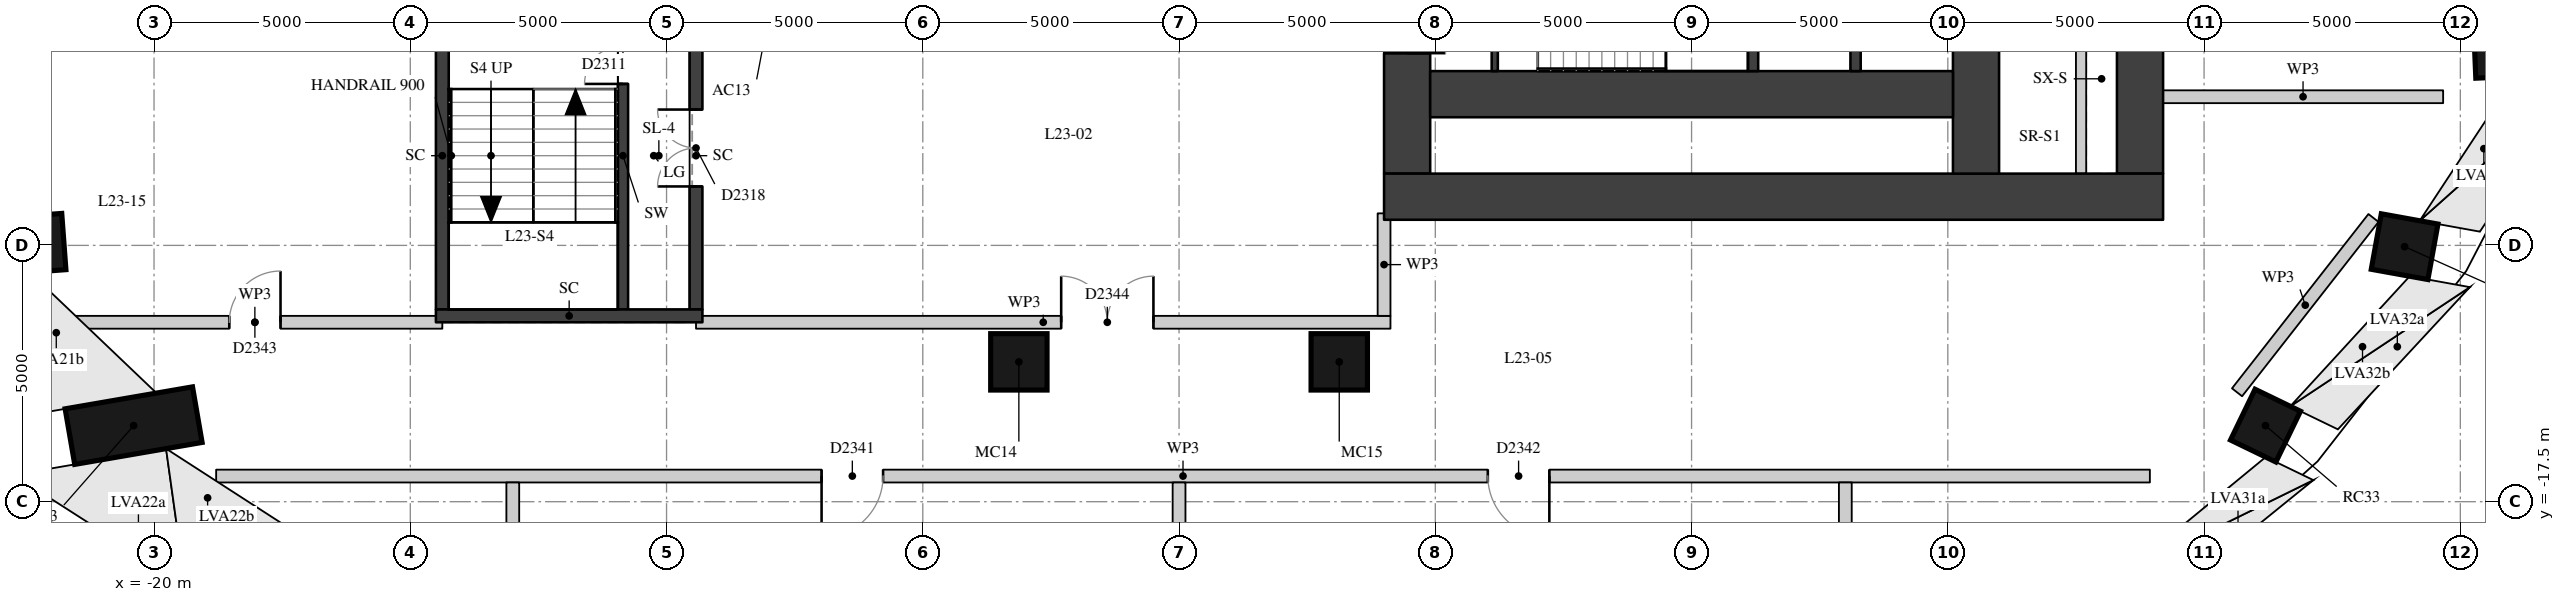
"""IFC4 building model, lengths in metres.
Left out: names, types, materials, properties, quantities, classifications, styles, units other than length and angle.
Written with IfcOpenShell. Run it as: python <this file> out.ifc"""

import sys

from ifc_helpers import new_model, si_unit, direction, frame, frame_2d, origin, origin_2d, place, context, subcontext, project, spatial, rectangle, extrude, element, fill, save


model = new_model("IFC4")
c1 = context("Model", 3, precision=1e-05, world=origin(), true_north=direction((0.0, 1.0)))
c2 = subcontext(c1, "Body", "Model", "MODEL_VIEW")
j1 = project(units=[si_unit("LENGTHUNIT", "METRE"), si_unit("PLANEANGLEUNIT", "RADIAN")], contexts=[c1])
p1 = place(None, origin())
s1 = spatial("IfcSite", under=j1, at=p1, CompositionType="ELEMENT")
p2 = place(p1, origin())
s2 = spatial("IfcBuilding", under=s1, at=p2, CompositionType="ELEMENT")
p3 = place(p2, frame((0.0, 0.0, 84.4)))
s3 = spatial("IfcBuildingStorey", under=s2, at=p3, CompositionType="ELEMENT", Elevation=84.4)
p4 = place(p3, frame((-24.465, -12.625, 0.452), z_axis=(0.600492037274, 0.044382544764, 0.798398085476), x_axis=(-0.796226262122, -0.058849319437, 0.602129966958)))
e1 = element("IfcColumn", 1, at=p4, inside=s3, PredefinedType="COLUMN", context=c2, shape_type="SweptSolid", body=[
    extrude(rectangle(XDim=1.5, YDim=1.1, at=origin_2d()), origin(), (0.0, 0.0, 1.0), 4.505),
])
p5 = place(p3, frame((-21.641, -16.23, 0.427), z_axis=(0.560538019427, 0.096634992544, 0.822471158761), x_axis=(-0.81051482165, -0.139730207465, 0.56880681519)))
e2 = element("IfcColumn", 2, at=p5, inside=s3, PredefinedType="COLUMN", context=c2, shape_type="SweptSolid", body=[
    extrude(rectangle(XDim=1.5, YDim=1.1, at=origin_2d()), origin(), (0.0, 0.0, 1.0), 4.434),
])
p6 = place(p3, frame((18.159, -19.343, 0.154), z_axis=(-0.143335748736, 0.14601438897, 0.978843532618), x_axis=(0.685710012277, -0.698524473739, 0.204610211505)))
e3 = element("IfcColumn", 3, at=p6, inside=s3, PredefinedType="COLUMN", context=c2, shape_type="SweptSolid", body=[
    extrude(rectangle(XDim=1.5, YDim=1.1, at=origin_2d()), origin(), (0.0, 0.0, 1.0), 4.284),
])
p7 = place(p3, frame((21.641, -16.23, 0.173), z_axis=(-0.207405022702, 0.100357269049, 0.97309381619), x_axis=(0.875939401139, -0.423841645712, 0.230409255224)))
e4 = element("IfcColumn", 4, at=p7, inside=s3, PredefinedType="COLUMN", context=c2, shape_type="SweptSolid", body=[
    extrude(rectangle(XDim=1.5, YDim=1.1, at=origin_2d()), origin(), (0.0, 0.0, 1.0), 4.27),
])
p8 = place(p3, frame((24.465, -12.625, 0.198), z_axis=(-0.259805612437, 0.046992225394, 0.964516860661), x_axis=(0.949116348071, -0.171671000236, 0.264021259563)))
e5 = element("IfcColumn", 5, at=p8, inside=s3, PredefinedType="COLUMN", context=c2, shape_type="SweptSolid", body=[
    extrude(rectangle(XDim=1.5, YDim=1.1, at=origin_2d()), origin(), (0.0, 0.0, 1.0), 4.255),
])
p9 = place(p3, frame((26.546, -8.636, 0.224), z_axis=(-0.298484434713, -0.012420080504, 0.95433368579), x_axis=(0.953508575153, 0.039675949188, 0.298742725712)))
e6 = element("IfcColumn", 6, at=p9, inside=s3, PredefinedType="COLUMN", context=c2, shape_type="SweptSolid", body=[
    extrude(rectangle(XDim=1.5, YDim=1.1, at=origin_2d()), origin(), (0.0, 0.0, 1.0), 4.246),
])
for number, where, z_axis, x_axis in (
    (7, (-3.126, -14.772, 0.0), (0.0, 0.0, 1.0), (1.0, 0.0, 0.0)),
    (8, (3.126, -14.772, 0.0), (0.0, 0.0, 1.0), (1.0, 0.0, 0.0)),
):
    element("IfcColumn", number, at=place(p3, frame(where, z_axis=z_axis, x_axis=x_axis)), inside=s3, PredefinedType="COLUMN", context=c2, shape_type="SweptSolid", body=[
        extrude(rectangle(XDim=1.1, YDim=1.1, at=origin_2d()), origin(), (0.0, 0.0, 1.0), 4.5),
    ])
p10 = place(p3, frame((4.45, -11.1, 0.0), z_axis=(0.0, 0.0, 1.0), x_axis=(0.0, 1.0, 0.0)))
e9 = element("IfcWall", 9, at=p10, inside=s3, PredefinedType="SHEAR", context=c2, shape_type="SweptSolid", body=[
    extrude(rectangle(XDim=22.2, YDim=0.9, at=frame_2d((11.1, 0.0))), origin(), (0.0, 0.0, 1.0), 4.22),
])
p11 = place(p10, frame((2.35, 0.0, 0.0)))
e10 = element("IfcOpeningElement", 10, at=p11, cuts=e9, PredefinedType="OPENING", context=c2, shape_type="SweptSolid", body=[
    extrude(rectangle(XDim=1.5, YDim=2.1, at=frame_2d((0.75, 1.05))), frame((0.0, 0.46, 0.0), z_axis=(0.0, -1.0, 0.0), x_axis=(1.0, 0.0, 0.0)), (0.0, 0.0, 1.0), 0.92),
])
p12 = place(p10, frame((5.45, 0.0, 0.0)))
e11 = element("IfcOpeningElement", 11, at=p12, cuts=e9, PredefinedType="OPENING", context=c2, shape_type="SweptSolid", body=[
    extrude(rectangle(XDim=1.8, YDim=2.1, at=frame_2d((0.9, 1.05))), frame((0.0, 0.46, 0.0), z_axis=(0.0, -1.0, 0.0), x_axis=(1.0, 0.0, 0.0)), (0.0, 0.0, 1.0), 0.92),
])
p13 = place(p10, frame((7.95, 0.0, 0.0)))
e12 = element("IfcOpeningElement", 12, at=p13, cuts=e9, PredefinedType="OPENING", context=c2, shape_type="SweptSolid", body=[
    extrude(rectangle(XDim=1.1, YDim=2.1, at=frame_2d((0.55, 1.05))), frame((0.0, 0.46, 0.0), z_axis=(0.0, -1.0, 0.0), x_axis=(1.0, 0.0, 0.0)), (0.0, 0.0, 1.0), 0.92),
])
p14 = place(p10, frame((10.6, 0.0, 0.0)))
e13 = element("IfcOpeningElement", 13, at=p14, cuts=e9, PredefinedType="OPENING", context=c2, shape_type="SweptSolid", body=[
    extrude(rectangle(XDim=1.0, YDim=2.1, at=frame_2d((0.5, 1.05))), frame((0.0, 0.46, 0.0), z_axis=(0.0, -1.0, 0.0), x_axis=(1.0, 0.0, 0.0)), (0.0, 0.0, 1.0), 0.92),
])
p15 = place(p10, frame((13.15, 0.0, 0.0)))
e14 = element("IfcOpeningElement", 14, at=p15, cuts=e9, PredefinedType="OPENING", context=c2, shape_type="SweptSolid", body=[
    extrude(rectangle(XDim=1.1, YDim=2.1, at=frame_2d((0.55, 1.05))), frame((0.0, 0.46, 0.0), z_axis=(0.0, -1.0, 0.0), x_axis=(1.0, 0.0, 0.0)), (0.0, 0.0, 1.0), 0.92),
])
p16 = place(p10, frame((14.95, 0.0, 0.0)))
e15 = element("IfcOpeningElement", 15, at=p16, cuts=e9, PredefinedType="OPENING", context=c2, shape_type="SweptSolid", body=[
    extrude(rectangle(XDim=1.8, YDim=2.1, at=frame_2d((0.9, 1.05))), frame((0.0, 0.46, 0.0), z_axis=(0.0, -1.0, 0.0), x_axis=(1.0, 0.0, 0.0)), (0.0, 0.0, 1.0), 0.92),
])
p17 = place(p10, frame((18.35, 0.0, 0.0)))
e16 = element("IfcOpeningElement", 16, at=p17, cuts=e9, PredefinedType="OPENING", context=c2, shape_type="SweptSolid", body=[
    extrude(rectangle(XDim=1.5, YDim=2.1, at=frame_2d((0.75, 1.05))), frame((0.0, 0.46, 0.0), z_axis=(0.0, -1.0, 0.0), x_axis=(1.0, 0.0, 0.0)), (0.0, 0.0, 1.0), 0.92),
])
p18 = place(p3, frame((18.75, -11.1, 0.0), z_axis=(0.0, 0.0, 1.0), x_axis=(0.0, 1.0, 0.0)))
e17 = element("IfcWall", 17, at=p18, inside=s3, PredefinedType="SHEAR", context=c2, shape_type="SweptSolid", body=[
    extrude(rectangle(XDim=22.2, YDim=0.9, at=frame_2d((11.1, 0.0))), origin(), (0.0, 0.0, 1.0), 4.22),
])
p19 = place(p3, frame((4.0, -11.55, 0.0), z_axis=(0.0, 0.0, 1.0), x_axis=(1.0, 0.0, 0.0)))
e18 = element("IfcWall", 18, at=p19, inside=s3, PredefinedType="SHEAR", context=c2, shape_type="SweptSolid", body=[
    extrude(rectangle(XDim=15.2, YDim=0.9, at=frame_2d((7.6, 0.0))), origin(), (0.0, 0.0, 1.0), 4.22),
])
p20 = place(p3, frame((15.55, -11.1, 0.0), z_axis=(0.0, 0.0, 1.0), x_axis=(0.0, 1.0, 0.0)))
e19 = element("IfcWall", 19, at=p20, inside=s3, PredefinedType="SHEAR", context=c2, shape_type="SweptSolid", body=[
    extrude(rectangle(XDim=22.2, YDim=0.9, at=frame_2d((11.1, 0.0))), origin(), (0.0, 0.0, 1.0), 4.22),
])
p21 = place(p20, frame((15.6, 0.0, 0.0)))
e20 = element("IfcOpeningElement", 20, at=p21, cuts=e19, PredefinedType="OPENING", context=c2, shape_type="SweptSolid", body=[
    extrude(rectangle(XDim=1.0, YDim=2.1, at=frame_2d((0.5, 1.05))), frame((0.0, 0.46, 0.0), z_axis=(0.0, -1.0, 0.0), x_axis=(1.0, 0.0, 0.0)), (0.0, 0.0, 1.0), 0.92),
])
p22 = place(p20, frame((5.6, 0.0, 0.0)))
e21 = element("IfcOpeningElement", 21, at=p22, cuts=e19, PredefinedType="OPENING", context=c2, shape_type="SweptSolid", body=[
    extrude(rectangle(XDim=1.0, YDim=2.1, at=frame_2d((0.5, 1.05))), frame((0.0, 0.46, 0.0), z_axis=(0.0, -1.0, 0.0), x_axis=(1.0, 0.0, 0.0)), (0.0, 0.0, 1.0), 0.92),
])
p23 = place(p3, frame((4.9, -9.55, 0.0), z_axis=(0.0, 0.0, 1.0), x_axis=(1.0, 0.0, 0.0)))
e22 = element("IfcWall", 22, at=p23, inside=s3, PredefinedType="SHEAR", context=c2, shape_type="SweptSolid", body=[
    extrude(rectangle(XDim=10.2, YDim=0.9, at=frame_2d((5.1, 0.0))), origin(), (0.0, 0.0, 1.0), 4.22),
])
for number, where, z_axis, x_axis in (
    (23, (11.2, -9.1, 0.0), (0.0, 0.0, 1.0), (0.0, 1.0, 0.0)),
    (24, (13.2, -9.1, 0.0), (0.0, 0.0, 1.0), (0.0, 1.0, 0.0)),
):
    element("IfcWall", number, at=place(p3, frame(where, z_axis=z_axis, x_axis=x_axis)), inside=s3, PredefinedType="SHEAR", context=c2, shape_type="SweptSolid", body=[
        extrude(rectangle(XDim=3.2, YDim=0.2, at=frame_2d((1.6, 0.0))), origin(), (0.0, 0.0, 1.0), 4.22),
    ])
p24 = place(p3, frame((6.16, -9.1, 0.0), z_axis=(0.0, 0.0, 1.0), x_axis=(0.0, 1.0, 0.0)))
e25 = element("IfcWall", 25, at=p24, inside=s3, PredefinedType="SHEAR", context=c2, shape_type="SweptSolid", body=[
    extrude(rectangle(XDim=3.2, YDim=0.12, at=frame_2d((1.6, 0.0))), origin(), (0.0, 0.0, 1.0), 4.22),
])
p25 = place(p24, frame((0.85, 0.0, 0.0)))
e26 = element("IfcOpeningElement", 26, at=p25, cuts=e25, PredefinedType="OPENING", context=c2, shape_type="SweptSolid", body=[
    extrude(rectangle(XDim=1.5, YDim=2.1, at=frame_2d((0.75, 1.05))), frame((0.0, 0.07, 0.0), z_axis=(0.0, -1.0, 0.0), x_axis=(1.0, 0.0, 0.0)), (0.0, 0.0, 1.0), 0.14),
])
p26 = place(p3, frame((-10.85, -13.75, 0.0), z_axis=(0.0, 0.0, 1.0), x_axis=(0.0, 1.0, 0.0)))
e27 = element("IfcWall", 27, at=p26, inside=s3, PredefinedType="SHEAR", context=c2, shape_type="SweptSolid", body=[
    extrude(rectangle(XDim=6.0, YDim=0.2, at=frame_2d((3.0, 0.0))), origin(), (0.0, 0.0, 1.0), 4.22),
])
p27 = place(p26, frame((4.4, 0.0, 0.0)))
e28 = element("IfcOpeningElement", 28, at=p27, cuts=e27, PredefinedType="OPENING", context=c2, shape_type="SweptSolid", body=[
    extrude(rectangle(XDim=1.5, YDim=2.1, at=frame_2d((0.75, 1.05))), frame((0.0, 0.11, 0.0), z_axis=(0.0, -1.0, 0.0), x_axis=(1.0, 0.0, 0.0)), (0.0, 0.0, 1.0), 0.22),
])
p28 = place(p3, frame((17.6, -11.1, 0.0), z_axis=(0.0, 0.0, 1.0), x_axis=(0.0, 1.0, 0.0)))
e29 = element("IfcWall", 29, at=p28, inside=s3, PredefinedType="PARTITIONING", context=c2, shape_type="SweptSolid", body=[
    extrude(rectangle(XDim=3.7, YDim=0.2, at=frame_2d((1.85, 0.0))), origin(), (0.0, 0.0, 1.0), 4.22),
])
p29 = place(p3, frame((-14.375, -13.75, -0.45), z_axis=(0.0, 0.0, 1.0), x_axis=(0.0, 1.0, 0.0)))
e30 = element("IfcWall", 30, at=p29, inside=s3, PredefinedType="SHEAR", context=c2, shape_type="SweptSolid", body=[
    extrude(rectangle(XDim=6.0, YDim=0.25, at=frame_2d((3.0, 0.0))), origin(), (0.0, 0.0, 1.0), 4.67),
])
p30 = place(p3, frame((-9.425, -13.75, -0.45), z_axis=(0.0, 0.0, 1.0), x_axis=(0.0, 1.0, 0.0)))
e31 = element("IfcWall", 31, at=p30, inside=s3, PredefinedType="SHEAR", context=c2, shape_type="SweptSolid", body=[
    extrude(rectangle(XDim=6.0, YDim=0.25, at=frame_2d((3.0, 0.0))), origin(), (0.0, 0.0, 1.0), 4.67),
])
p31 = place(p30, frame((2.4, 0.0, 0.45)))
e32 = element("IfcOpeningElement", 32, at=p31, cuts=e31, PredefinedType="OPENING", context=c2, shape_type="SweptSolid", body=[
    extrude(rectangle(XDim=1.5, YDim=2.1, at=frame_2d((0.75, 1.05))), frame((0.0, 0.135, 0.0), z_axis=(0.0, -1.0, 0.0), x_axis=(1.0, 0.0, 0.0)), (0.0, 0.0, 1.0), 0.27),
])
p32 = place(p3, frame((-14.5, -13.875, -0.45), z_axis=(0.0, 0.0, 1.0), x_axis=(1.0, 0.0, 0.0)))
e33 = element("IfcWall", 33, at=p32, inside=s3, PredefinedType="SHEAR", context=c2, shape_type="SweptSolid", body=[
    extrude(rectangle(XDim=5.2, YDim=0.25, at=frame_2d((2.6, 0.0))), origin(), (0.0, 0.0, 1.0), 4.67),
])
p33 = place(p3, frame((20.643, -15.366, 0.0), z_axis=(0.0, 0.0, 1.0), x_axis=(0.61641495594, 0.787421489479, 0.0)))
e34 = element("IfcWall", 34, at=p33, inside=s3, PredefinedType="PARTITIONING", context=c2, shape_type="SweptSolid", body=[
    extrude(rectangle(XDim=4.319, YDim=0.25, at=frame_2d((2.159, 0.0))), origin(), (0.0, 0.0, 1.0), 4.22),
])
p34 = place(p3, frame((-18.788, -17.0, 0.0), z_axis=(0.0, 0.0, 1.0), x_axis=(1.0, 0.0, 0.0)))
e35 = element("IfcWall", 35, at=p34, inside=s3, PredefinedType="PARTITIONING", context=c2, shape_type="SweptSolid", body=[
    extrude(rectangle(XDim=37.73, YDim=0.25, at=frame_2d((18.865, 0.0))), origin(), (0.0, 0.0, 1.0), 4.22),
])
p35 = place(p34, frame((11.813, 0.0, 0.0)))
e36 = element("IfcOpeningElement", 36, at=p35, cuts=e35, PredefinedType="OPENING", context=c2, shape_type="SweptSolid", body=[
    extrude(rectangle(XDim=1.2, YDim=2.1, at=frame_2d((0.6, 1.05))), frame((0.0, 0.135, 0.0), z_axis=(0.0, -1.0, 0.0), x_axis=(1.0, 0.0, 0.0)), (0.0, 0.0, 1.0), 0.27),
])
p36 = place(p34, frame((24.813, 0.0, 0.0)))
e37 = element("IfcOpeningElement", 37, at=p36, cuts=e35, PredefinedType="OPENING", context=c2, shape_type="SweptSolid", body=[
    extrude(rectangle(XDim=1.2, YDim=2.1, at=frame_2d((0.6, 1.05))), frame((0.0, 0.135, 0.0), z_axis=(0.0, -1.0, 0.0), x_axis=(1.0, 0.0, 0.0)), (0.0, 0.0, 1.0), 0.27),
])
p37 = place(p3, frame((-21.69, -14.0, 0.0), z_axis=(0.0, 0.0, 1.0), x_axis=(1.0, 0.0, 0.0)))
e38 = element("IfcWall", 38, at=p37, inside=s3, PredefinedType="PARTITIONING", context=c2, shape_type="SweptSolid", body=[
    extrude(rectangle(XDim=7.315, YDim=0.25, at=frame_2d((3.657, 0.0))), origin(), (0.0, 0.0, 1.0), 4.22),
])
p38 = place(p37, frame((3.158, 0.0, 0.0)))
e39 = element("IfcOpeningElement", 39, at=p38, cuts=e38, PredefinedType="OPENING", context=c2, shape_type="SweptSolid", body=[
    extrude(rectangle(XDim=1.0, YDim=2.1, at=frame_2d((0.5, 1.05))), frame((0.0, 0.135, 0.0), z_axis=(0.0, -1.0, 0.0), x_axis=(1.0, 0.0, 0.0)), (0.0, 0.0, 1.0), 0.27),
])
p39 = place(p3, frame((-9.425, -14.0, 0.0), z_axis=(0.0, 0.0, 1.0), x_axis=(1.0, 0.0, 0.0)))
e40 = element("IfcWall", 40, at=p39, inside=s3, PredefinedType="PARTITIONING", context=c2, shape_type="SweptSolid", body=[
    extrude(rectangle(XDim=13.55, YDim=0.25, at=frame_2d((6.775, 0.0))), origin(), (0.0, 0.0, 1.0), 4.22),
])
p40 = place(p39, frame((7.125, 0.0, 0.0)))
e41 = element("IfcOpeningElement", 41, at=p40, cuts=e40, PredefinedType="OPENING", context=c2, shape_type="SweptSolid", body=[
    extrude(rectangle(XDim=1.8, YDim=2.1, at=frame_2d((0.9, 1.05))), frame((0.0, 0.135, 0.0), z_axis=(0.0, -1.0, 0.0), x_axis=(1.0, 0.0, 0.0)), (0.0, 0.0, 1.0), 0.27),
])
p41 = place(p3, frame((19.198, -9.6, 0.0), z_axis=(0.0, 0.0, 1.0), x_axis=(1.0, 0.0, 0.0)))
e42 = element("IfcWall", 42, at=p41, inside=s3, PredefinedType="PARTITIONING", context=c2, shape_type="SweptSolid", body=[
    extrude(rectangle(XDim=5.467, YDim=0.25, at=frame_2d((2.733, 0.0))), origin(), (0.0, 0.0, 1.0), 4.22),
])
p42 = place(p3, frame((-13.0, -20.989, 0.0), z_axis=(0.0, 0.0, 1.0), x_axis=(0.0, 1.0, 0.0)))
e43 = element("IfcWall", 43, at=p42, inside=s3, PredefinedType="PARTITIONING", context=c2, shape_type="SweptSolid", body=[
    extrude(rectangle(XDim=3.864, YDim=0.25, at=frame_2d((1.932, 0.0))), origin(), (0.0, 0.0, 1.0), 3.77),
])
p43 = place(p3, frame((0.0, -24.045, 0.0), z_axis=(0.0, 0.0, 1.0), x_axis=(0.0, 1.0, 0.0)))
e44 = element("IfcWall", 44, at=p43, inside=s3, PredefinedType="PARTITIONING", context=c2, shape_type="SweptSolid", body=[
    extrude(rectangle(XDim=6.92, YDim=0.25, at=frame_2d((3.46, 0.0))), origin(), (0.0, 0.0, 1.0), 3.67),
])
p44 = place(p3, frame((4.0, -13.875, 0.0), z_axis=(0.0, 0.0, 1.0), x_axis=(0.0, 1.0, 0.0)))
e45 = element("IfcWall", 45, at=p44, inside=s3, PredefinedType="PARTITIONING", context=c2, shape_type="SweptSolid", body=[
    extrude(rectangle(XDim=2.0, YDim=0.25, at=frame_2d((1.0, 0.0))), origin(), (0.0, 0.0, 1.0), 4.22),
])
p45 = place(p3, frame((13.0, -21.052, 0.0), z_axis=(0.0, 0.0, 1.0), x_axis=(0.0, 1.0, 0.0)))
e46 = element("IfcWall", 46, at=p45, inside=s3, PredefinedType="PARTITIONING", context=c2, shape_type="SweptSolid", body=[
    extrude(rectangle(XDim=3.927, YDim=0.25, at=frame_2d((1.964, 0.0))), origin(), (0.0, 0.0, 1.0), 3.67),
])
p46 = place(p11, origin())
e47 = element("IfcDoor", 47, at=p46, inside=s3, OperationType="DOUBLE_DOOR_SINGLE_SWING", PredefinedType="DOOR", context=c2, shape_type="SweptSolid", body=[
    extrude(rectangle(XDim=1.5, YDim=2.1, at=frame_2d((0.75, 1.05))), frame((0.0, 0.025, 0.0), z_axis=(0.0, -1.0, 0.0), x_axis=(1.0, 0.0, 0.0)), (0.0, 0.0, 1.0), 0.05),
])
fill(e10, e47)
p47 = place(p27, origin())
e48 = element("IfcDoor", 48, at=p47, inside=s3, OperationType="DOUBLE_DOOR_SINGLE_SWING", PredefinedType="DOOR", context=c2, shape_type="SweptSolid", body=[
    extrude(rectangle(XDim=1.5, YDim=2.1, at=frame_2d((0.75, 1.05))), frame((0.0, 0.025, 0.0), z_axis=(0.0, -1.0, 0.0), x_axis=(1.0, 0.0, 0.0)), (0.0, 0.0, 1.0), 0.05),
])
fill(e28, e48)
p48 = place(p31, origin())
e49 = element("IfcDoor", 49, at=p48, inside=s3, OperationType="DOUBLE_DOOR_SINGLE_SWING", PredefinedType="DOOR", context=c2, shape_type="SweptSolid", body=[
    extrude(rectangle(XDim=1.5, YDim=2.1, at=frame_2d((0.75, 1.05))), frame((0.0, 0.025, 0.0), z_axis=(0.0, -1.0, 0.0), x_axis=(1.0, 0.0, 0.0)), (0.0, 0.0, 1.0), 0.05),
])
fill(e32, e49)
p49 = place(p35, origin())
e50 = element("IfcDoor", 50, at=p49, inside=s3, OperationType="SINGLE_SWING_RIGHT", PredefinedType="DOOR", context=c2, shape_type="SweptSolid", body=[
    extrude(rectangle(XDim=1.2, YDim=2.1, at=frame_2d((0.6, 1.05))), frame((0.0, 0.025, 0.0), z_axis=(0.0, -1.0, 0.0), x_axis=(1.0, 0.0, 0.0)), (0.0, 0.0, 1.0), 0.05),
])
fill(e36, e50)
p50 = place(p36, origin())
e51 = element("IfcDoor", 51, at=p50, inside=s3, OperationType="SINGLE_SWING_LEFT", PredefinedType="DOOR", context=c2, shape_type="SweptSolid", body=[
    extrude(rectangle(XDim=1.2, YDim=2.1, at=frame_2d((0.6, 1.05))), frame((0.0, 0.025, 0.0), z_axis=(0.0, -1.0, 0.0), x_axis=(1.0, 0.0, 0.0)), (0.0, 0.0, 1.0), 0.05),
])
fill(e37, e51)
p51 = place(p40, origin())
e52 = element("IfcDoor", 52, at=p51, inside=s3, OperationType="DOUBLE_DOOR_SINGLE_SWING", PredefinedType="DOOR", context=c2, shape_type="SweptSolid", body=[
    extrude(rectangle(XDim=1.8, YDim=2.1, at=frame_2d((0.9, 1.05))), frame((0.0, 0.025, 0.0), z_axis=(0.0, -1.0, 0.0), x_axis=(1.0, 0.0, 0.0)), (0.0, 0.0, 1.0), 0.05),
])
fill(e41, e52)
p52 = place(p38, origin())
e53 = element("IfcDoor", 53, at=p52, inside=s3, OperationType="SINGLE_SWING_RIGHT", PredefinedType="DOOR", context=c2, shape_type="SweptSolid", body=[
    extrude(rectangle(XDim=1.0, YDim=2.1, at=frame_2d((0.5, 1.05))), frame((0.0, 0.025, 0.0), z_axis=(0.0, -1.0, 0.0), x_axis=(1.0, 0.0, 0.0)), (0.0, 0.0, 1.0), 0.05),
])
fill(e39, e53)
save(model, sys.argv[1])
